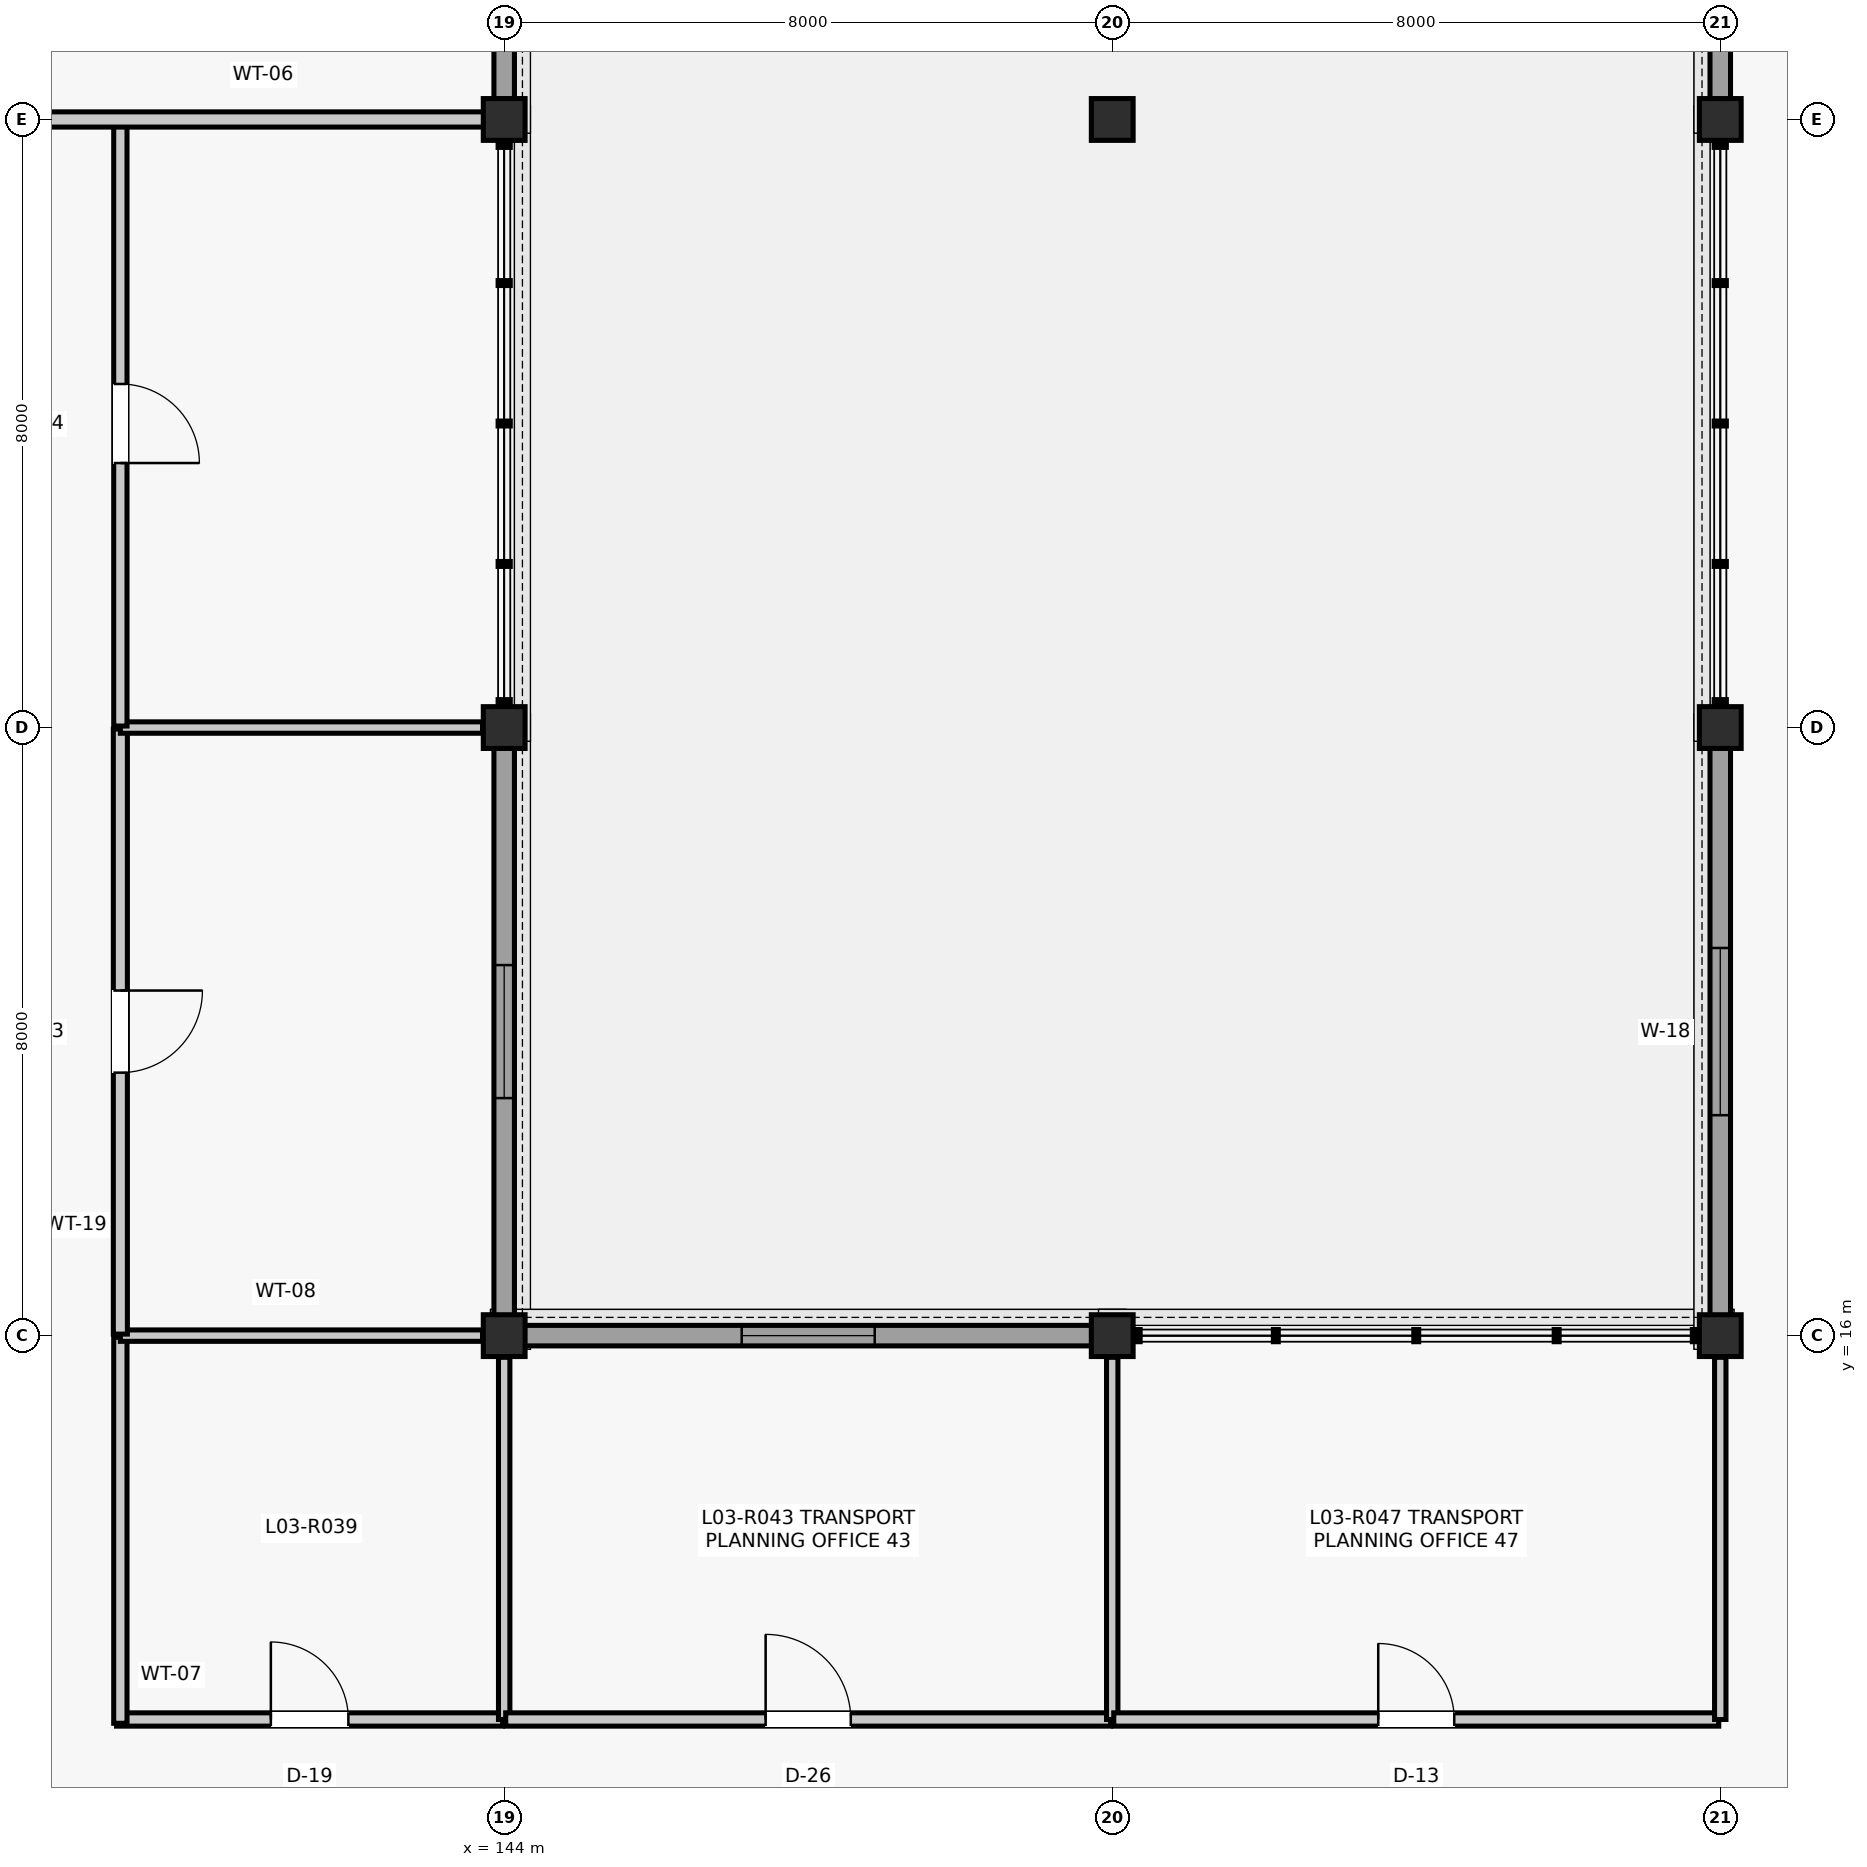
"""IFC4 building model, lengths in metres.
Left out: names, types, materials, properties, quantities, classifications, styles, units other than length and angle.
Written with IfcOpenShell. Run it as: python <this file> out.ifc"""

import sys

from ifc_helpers import new_model, si_unit, direction, frame, frame_2d, origin, origin_2d, place, context, subcontext, project, spatial, rectangle, extrude, element, fill, save


model = new_model("IFC4")
c1 = context("Model", 3, precision=1e-05, world=origin(), true_north=direction((0.0, 1.0)))
c2 = subcontext(c1, "Body", "Model", "MODEL_VIEW")
j1 = project(units=[si_unit("LENGTHUNIT", "METRE"), si_unit("PLANEANGLEUNIT", "RADIAN")], contexts=[c1])
p1 = place(None, origin())
s1 = spatial("IfcSite", under=j1, at=p1, CompositionType="ELEMENT")
p2 = place(p1, origin())
s2 = spatial("IfcBuilding", under=s1, at=p2, CompositionType="ELEMENT")
p3 = place(p2, frame((0.0, 0.0, 13.86)))
s3 = spatial("IfcBuildingStorey", under=s2, at=p3, CompositionType="ELEMENT", Elevation=13.86)
for number, where, z_axis, x_axis in (
    (1, (144.0, 16.0, 0.0), (0.0, 0.0, 1.0), (1.0, 0.0, 0.0)),
    (2, (144.0, 24.0, 0.0), (0.0, 0.0, 1.0), (1.0, 0.0, 0.0)),
    (3, (144.0, 32.0, 0.0), (0.0, 0.0, 1.0), (1.0, 0.0, 0.0)),
    (4, (152.0, 16.0, 0.0), (0.0, 0.0, 1.0), (1.0, 0.0, 0.0)),
    (5, (152.0, 32.0, 0.0), (0.0, 0.0, 1.0), (1.0, 0.0, 0.0)),
    (6, (160.0, 16.0, 0.0), (0.0, 0.0, 1.0), (1.0, 0.0, 0.0)),
    (7, (160.0, 24.0, 0.0), (0.0, 0.0, 1.0), (1.0, 0.0, 0.0)),
    (8, (160.0, 32.0, 0.0), (0.0, 0.0, 1.0), (1.0, 0.0, 0.0)),
):
    element("IfcColumn", number, at=place(p3, frame(where, z_axis=z_axis, x_axis=x_axis)), inside=s3, PredefinedType="COLUMN", context=c2, shape_type="SweptSolid", body=[
        extrude(rectangle(XDim=0.55, YDim=0.55, at=origin_2d()), origin(), (0.0, 0.0, 1.0), 3.96),
    ])
p4 = place(p3, frame((144.0, 16.26, 0.0), z_axis=(0.0, 0.0, 1.0), x_axis=(0.0, 1.0, 0.0)))
e9 = element("IfcWall", 9, at=p4, inside=s3, PredefinedType="SOLIDWALL", context=c2, shape_type="SweptSolid", body=[
    extrude(rectangle(XDim=7.48, YDim=0.27, at=frame_2d((3.74, 0.0))), origin(), (0.0, 0.0, 1.0), 3.454),
])
p5 = place(p4, frame((2.865, 0.0, 0.9)))
e10 = element("IfcOpeningElement", 10, at=p5, cuts=e9, PredefinedType="OPENING", context=c2, shape_type="SweptSolid", body=[
    extrude(rectangle(XDim=1.75, YDim=1.85, at=frame_2d((0.875, 0.925))), frame((0.0, 0.145, 0.0), z_axis=(0.0, -1.0, 0.0), x_axis=(1.0, 0.0, 0.0)), (0.0, 0.0, 1.0), 0.29),
])
p6 = place(p3, frame((144.0, 32.26, 0.0), z_axis=(0.0, 0.0, 1.0), x_axis=(0.0, 1.0, 0.0)))
e11 = element("IfcWall", 11, at=p6, inside=s3, PredefinedType="SOLIDWALL", context=c2, shape_type="SweptSolid", body=[
    extrude(rectangle(XDim=7.48, YDim=0.27, at=frame_2d((3.74, 0.0))), origin(), (0.0, 0.0, 1.0), 3.359),
])
p7 = place(p6, frame((2.865, 0.0, 0.9)))
e12 = element("IfcOpeningElement", 12, at=p7, cuts=e11, PredefinedType="OPENING", context=c2, shape_type="SweptSolid", body=[
    extrude(rectangle(XDim=1.75, YDim=1.85, at=frame_2d((0.875, 0.925))), frame((0.0, 0.145, 0.0), z_axis=(0.0, -1.0, 0.0), x_axis=(1.0, 0.0, 0.0)), (0.0, 0.0, 1.0), 0.29),
])
p8 = place(p3, frame((144.26, 16.0, 0.0), z_axis=(0.0, 0.0, 1.0), x_axis=(1.0, 0.0, 0.0)))
e13 = element("IfcWall", 13, at=p8, inside=s3, PredefinedType="SOLIDWALL", context=c2, shape_type="SweptSolid", body=[
    extrude(rectangle(XDim=7.48, YDim=0.27, at=frame_2d((3.74, 0.0))), origin(), (0.0, 0.0, 1.0), 3.254),
])
p9 = place(p8, frame((2.865, 0.0, 0.9)))
e14 = element("IfcOpeningElement", 14, at=p9, cuts=e13, PredefinedType="OPENING", context=c2, shape_type="SweptSolid", body=[
    extrude(rectangle(XDim=1.75, YDim=1.85, at=frame_2d((0.875, 0.925))), frame((0.0, 0.145, 0.0), z_axis=(0.0, -1.0, 0.0), x_axis=(1.0, 0.0, 0.0)), (0.0, 0.0, 1.0), 0.29),
])
p10 = place(p3, frame((160.0, 16.26, 0.0), z_axis=(0.0, 0.0, 1.0), x_axis=(0.0, 1.0, 0.0)))
e15 = element("IfcWall", 15, at=p10, inside=s3, PredefinedType="SOLIDWALL", context=c2, shape_type="SweptSolid", body=[
    extrude(rectangle(XDim=7.48, YDim=0.27, at=frame_2d((3.74, 0.0))), origin(), (0.0, 0.0, 1.0), 3.255),
])
p11 = place(p10, frame((2.64, 0.0, 1.35)))
e16 = element("IfcOpeningElement", 16, at=p11, cuts=e15, PredefinedType="OPENING", context=c2, shape_type="SweptSolid", body=[
    extrude(rectangle(XDim=2.2, YDim=1.3, at=frame_2d((1.1, 0.65))), frame((0.0, 0.145, 0.0), z_axis=(0.0, -1.0, 0.0), x_axis=(1.0, 0.0, 0.0)), (0.0, 0.0, 1.0), 0.29),
])
p12 = place(p3, frame((160.0, 32.26, 0.0), z_axis=(0.0, 0.0, 1.0), x_axis=(0.0, 1.0, 0.0)))
e17 = element("IfcWall", 17, at=p12, inside=s3, PredefinedType="SOLIDWALL", context=c2, shape_type="SweptSolid", body=[
    extrude(rectangle(XDim=7.48, YDim=0.27, at=frame_2d((3.74, 0.0))), origin(), (0.0, 0.0, 1.0), 3.372),
])
p13 = place(p12, frame((0.671, 0.0, 0.95)))
e18 = element("IfcOpeningElement", 18, at=p13, cuts=e17, PredefinedType="OPENING", context=c2, shape_type="SweptSolid", body=[
    extrude(rectangle(XDim=1.35, YDim=1.9, at=frame_2d((0.675, 0.95))), frame((0.0, 0.145, 0.0), z_axis=(0.0, -1.0, 0.0), x_axis=(1.0, 0.0, 0.0)), (0.0, 0.0, 1.0), 0.29),
])
p14 = place(p12, frame((5.458, 0.0, 0.95)))
e19 = element("IfcOpeningElement", 19, at=p14, cuts=e17, PredefinedType="OPENING", context=c2, shape_type="SweptSolid", body=[
    extrude(rectangle(XDim=1.35, YDim=1.9, at=frame_2d((0.675, 0.95))), frame((0.0, 0.145, 0.0), z_axis=(0.0, -1.0, 0.0), x_axis=(1.0, 0.0, 0.0)), (0.0, 0.0, 1.0), 0.29),
])
p15 = place(p3, frame((138.9, 10.95, 0.0), z_axis=(0.0, 0.0, 1.0), x_axis=(1.0, 0.0, 0.0)))
e20 = element("IfcWall", 20, at=p15, inside=s3, PredefinedType="PARTITIONING", context=c2, shape_type="SweptSolid", body=[
    extrude(rectangle(XDim=5.08, YDim=0.175, at=frame_2d((2.54, 0.0))), origin(), (0.0, 0.0, 1.0), 3.248),
])
p16 = place(p15, frame((2.03, 0.0, 0.0)))
e21 = element("IfcOpeningElement", 21, at=p16, cuts=e20, PredefinedType="OPENING", context=c2, shape_type="SweptSolid", body=[
    extrude(rectangle(XDim=1.02, YDim=2.2, at=frame_2d((0.51, 1.1))), frame((0.0, 0.097, 0.0), z_axis=(0.0, -1.0, 0.0), x_axis=(1.0, 0.0, 0.0)), (0.0, 0.0, 1.0), 0.195),
])
p17 = place(p3, frame((138.95, 10.9, 0.0), z_axis=(0.0, 0.0, 1.0), x_axis=(0.0, 1.0, 0.0)))
e22 = element("IfcWall", 22, at=p17, inside=s3, PredefinedType="PARTITIONING", context=c2, shape_type="SweptSolid", body=[
    extrude(rectangle(XDim=5.08, YDim=0.175, at=frame_2d((2.54, 0.0))), origin(), (0.0, 0.0, 1.0), 3.447),
])
p18 = place(p3, frame((138.95, 16.0, 0.0), z_axis=(0.0, 0.0, 1.0), x_axis=(1.0, 0.0, 0.0)))
e23 = element("IfcWall", 23, at=p18, inside=s3, PredefinedType="PARTITIONING", context=c2, shape_type="SweptSolid", body=[
    extrude(rectangle(XDim=4.765, YDim=0.15, at=frame_2d((2.383, 0.0))), origin(), (0.0, 0.0, 1.0), 3.447),
])
p19 = place(p3, frame((144.0, 10.95, 0.0), z_axis=(0.0, 0.0, 1.0), x_axis=(0.0, 1.0, 0.0)))
e24 = element("IfcWall", 24, at=p19, inside=s3, PredefinedType="PARTITIONING", context=c2, shape_type="SweptSolid", body=[
    extrude(rectangle(XDim=4.765, YDim=0.15, at=frame_2d((2.383, 0.0))), origin(), (0.0, 0.0, 1.0), 3.248),
])
p20 = place(p3, frame((138.95, 16.02, 0.0), z_axis=(0.0, 0.0, 1.0), x_axis=(0.0, 1.0, 0.0)))
e25 = element("IfcWall", 25, at=p20, inside=s3, PredefinedType="PARTITIONING", context=c2, shape_type="SweptSolid", body=[
    extrude(rectangle(XDim=7.96, YDim=0.185, at=frame_2d((3.98, 0.0))), origin(), (0.0, 0.0, 1.0), 3.242),
])
p21 = place(p20, frame((3.44, 0.0, 0.0)))
e26 = element("IfcOpeningElement", 26, at=p21, cuts=e25, PredefinedType="OPENING", context=c2, shape_type="SweptSolid", body=[
    extrude(rectangle(XDim=1.08, YDim=2.2, at=frame_2d((0.54, 1.1))), frame((0.0, 0.103, 0.0), z_axis=(0.0, -1.0, 0.0), x_axis=(1.0, 0.0, 0.0)), (0.0, 0.0, 1.0), 0.205),
])
p22 = place(p3, frame((138.95, 24.0, 0.0), z_axis=(0.0, 0.0, 1.0), x_axis=(1.0, 0.0, 0.0)))
e27 = element("IfcWall", 27, at=p22, inside=s3, PredefinedType="PARTITIONING", context=c2, shape_type="SweptSolid", body=[
    extrude(rectangle(XDim=4.765, YDim=0.15, at=frame_2d((2.383, 0.0))), origin(), (0.0, 0.0, 1.0), 3.242),
])
p23 = place(p3, frame((138.95, 24.02, 0.0), z_axis=(0.0, 0.0, 1.0), x_axis=(0.0, 1.0, 0.0)))
e28 = element("IfcWall", 28, at=p23, inside=s3, PredefinedType="PARTITIONING", context=c2, shape_type="SweptSolid", body=[
    extrude(rectangle(XDim=7.96, YDim=0.175, at=frame_2d((3.98, 0.0))), origin(), (0.0, 0.0, 1.0), 3.242),
])
p24 = place(p23, frame((3.46, 0.0, 0.0)))
e29 = element("IfcOpeningElement", 29, at=p24, cuts=e28, PredefinedType="OPENING", context=c2, shape_type="SweptSolid", body=[
    extrude(rectangle(XDim=1.04, YDim=2.18, at=frame_2d((0.52, 1.09))), frame((0.0, 0.097, 0.0), z_axis=(0.0, -1.0, 0.0), x_axis=(1.0, 0.0, 0.0)), (0.0, 0.0, 1.0), 0.195),
])
p25 = place(p3, frame((144.02, 10.95, 0.0), z_axis=(0.0, 0.0, 1.0), x_axis=(1.0, 0.0, 0.0)))
e30 = element("IfcWall", 30, at=p25, inside=s3, PredefinedType="PARTITIONING", context=c2, shape_type="SweptSolid", body=[
    extrude(rectangle(XDim=7.96, YDim=0.175, at=frame_2d((3.98, 0.0))), origin(), (0.0, 0.0, 1.0), 3.248),
])
p26 = place(p25, frame((3.42, 0.0, 0.0)))
e31 = element("IfcOpeningElement", 31, at=p26, cuts=e30, PredefinedType="OPENING", context=c2, shape_type="SweptSolid", body=[
    extrude(rectangle(XDim=1.12, YDim=2.22, at=frame_2d((0.56, 1.11))), frame((0.0, 0.097, 0.0), z_axis=(0.0, -1.0, 0.0), x_axis=(1.0, 0.0, 0.0)), (0.0, 0.0, 1.0), 0.195),
])
p27 = place(p3, frame((152.0, 10.95, 0.0), z_axis=(0.0, 0.0, 1.0), x_axis=(0.0, 1.0, 0.0)))
e32 = element("IfcWall", 32, at=p27, inside=s3, PredefinedType="PARTITIONING", context=c2, shape_type="SweptSolid", body=[
    extrude(rectangle(XDim=4.765, YDim=0.15, at=frame_2d((2.383, 0.0))), origin(), (0.0, 0.0, 1.0), 3.452),
])
p28 = place(p3, frame((152.02, 10.95, 0.0), z_axis=(0.0, 0.0, 1.0), x_axis=(1.0, 0.0, 0.0)))
e33 = element("IfcWall", 33, at=p28, inside=s3, PredefinedType="PARTITIONING", context=c2, shape_type="SweptSolid", body=[
    extrude(rectangle(XDim=7.96, YDim=0.175, at=frame_2d((3.98, 0.0))), origin(), (0.0, 0.0, 1.0), 3.242),
])
p29 = place(p28, frame((3.48, 0.0, 0.0)))
e34 = element("IfcOpeningElement", 34, at=p29, cuts=e33, PredefinedType="OPENING", context=c2, shape_type="SweptSolid", body=[
    extrude(rectangle(XDim=1.0, YDim=2.15, at=frame_2d((0.5, 1.075))), frame((0.0, 0.097, 0.0), z_axis=(0.0, -1.0, 0.0), x_axis=(1.0, 0.0, 0.0)), (0.0, 0.0, 1.0), 0.195),
])
p30 = place(p3, frame((160.0, 10.95, 0.0), z_axis=(0.0, 0.0, 1.0), x_axis=(0.0, 1.0, 0.0)))
e35 = element("IfcWall", 35, at=p30, inside=s3, PredefinedType="PARTITIONING", context=c2, shape_type="SweptSolid", body=[
    extrude(rectangle(XDim=4.765, YDim=0.15, at=frame_2d((2.383, 0.0))), origin(), (0.0, 0.0, 1.0), 3.242),
])
p31 = place(p3, frame((136.265, 32.0, 0.0), z_axis=(0.0, 0.0, 1.0), x_axis=(1.0, 0.0, 0.0)))
e36 = element("IfcWall", 36, at=p31, inside=s3, PredefinedType="PARTITIONING", context=c2, shape_type="SweptSolid", body=[
    extrude(rectangle(XDim=7.47, YDim=0.2, at=frame_2d((3.735, 0.0))), origin(), (0.0, 0.0, 1.0), 3.248),
])
p32 = place(p31, frame((0.52, 0.0, 0.0)))
e37 = element("IfcOpeningElement", 37, at=p32, cuts=e36, PredefinedType="OPENING", context=c2, shape_type="SweptSolid", body=[
    extrude(rectangle(XDim=0.94, YDim=2.12, at=frame_2d((0.47, 1.06))), frame((0.0, 0.11, 0.0), z_axis=(0.0, -1.0, 0.0), x_axis=(1.0, 0.0, 0.0)), (0.0, 0.0, 1.0), 0.22),
])
p33 = place(p5, origin())
e38 = element("IfcWindow", 38, at=p33, inside=s3, PartitioningType="SINGLE_PANEL", PredefinedType="WINDOW", context=c2, shape_type="SweptSolid", body=[
    extrude(rectangle(XDim=1.75, YDim=1.85, at=frame_2d((0.875, 0.925))), frame((0.0, 0.03, 0.0), z_axis=(0.0, -1.0, 0.0), x_axis=(1.0, 0.0, 0.0)), (0.0, 0.0, 1.0), 0.06),
])
fill(e10, e38)
p34 = place(p9, origin())
e39 = element("IfcWindow", 39, at=p34, inside=s3, PartitioningType="SINGLE_PANEL", PredefinedType="WINDOW", context=c2, shape_type="SweptSolid", body=[
    extrude(rectangle(XDim=1.75, YDim=1.85, at=frame_2d((0.875, 0.925))), frame((0.0, 0.03, 0.0), z_axis=(0.0, -1.0, 0.0), x_axis=(1.0, 0.0, 0.0)), (0.0, 0.0, 1.0), 0.06),
])
fill(e14, e39)
p35 = place(p11, origin())
e40 = element("IfcWindow", 40, at=p35, inside=s3, PartitioningType="SINGLE_PANEL", PredefinedType="WINDOW", context=c2, shape_type="SweptSolid", body=[
    extrude(rectangle(XDim=2.2, YDim=1.3, at=frame_2d((1.1, 0.65))), frame((0.0, 0.03, 0.0), z_axis=(0.0, -1.0, 0.0), x_axis=(1.0, 0.0, 0.0)), (0.0, 0.0, 1.0), 0.06),
])
fill(e16, e40)
p36 = place(p16, origin())
e41 = element("IfcDoor", 41, at=p36, inside=s3, OperationType="SINGLE_SWING_LEFT", PredefinedType="DOOR", context=c2, shape_type="SweptSolid", body=[
    extrude(rectangle(XDim=1.02, YDim=2.2, at=frame_2d((0.51, 1.1))), frame((0.0, 0.025, 0.0), z_axis=(0.0, -1.0, 0.0), x_axis=(1.0, 0.0, 0.0)), (0.0, 0.0, 1.0), 0.05),
])
fill(e21, e41)
p37 = place(p21, frame((1.08, 0.0, 0.0), z_axis=(0.0, 0.0, 1.0), x_axis=(-1.0, 0.0, 0.0)))
e42 = element("IfcDoor", 42, at=p37, inside=s3, OperationType="SINGLE_SWING_RIGHT", PredefinedType="DOOR", context=c2, shape_type="SweptSolid", body=[
    extrude(rectangle(XDim=1.08, YDim=2.2, at=frame_2d((0.54, 1.1))), frame((0.0, 0.025, 0.0), z_axis=(0.0, -1.0, 0.0), x_axis=(1.0, 0.0, 0.0)), (0.0, 0.0, 1.0), 0.05),
])
fill(e26, e42)
p38 = place(p24, frame((1.04, 0.0, 0.0), z_axis=(0.0, 0.0, 1.0), x_axis=(-1.0, 0.0, 0.0)))
e43 = element("IfcDoor", 43, at=p38, inside=s3, OperationType="SINGLE_SWING_LEFT", PredefinedType="DOOR", context=c2, shape_type="SweptSolid", body=[
    extrude(rectangle(XDim=1.04, YDim=2.18, at=frame_2d((0.52, 1.09))), frame((0.0, 0.025, 0.0), z_axis=(0.0, -1.0, 0.0), x_axis=(1.0, 0.0, 0.0)), (0.0, 0.0, 1.0), 0.05),
])
fill(e29, e43)
p39 = place(p26, origin())
e44 = element("IfcDoor", 44, at=p39, inside=s3, OperationType="SINGLE_SWING_LEFT", PredefinedType="DOOR", context=c2, shape_type="SweptSolid", body=[
    extrude(rectangle(XDim=1.12, YDim=2.22, at=frame_2d((0.56, 1.11))), frame((0.0, 0.025, 0.0), z_axis=(0.0, -1.0, 0.0), x_axis=(1.0, 0.0, 0.0)), (0.0, 0.0, 1.0), 0.05),
])
fill(e31, e44)
p40 = place(p29, origin())
e45 = element("IfcDoor", 45, at=p40, inside=s3, OperationType="SINGLE_SWING_LEFT", PredefinedType="DOOR", context=c2, shape_type="SweptSolid", body=[
    extrude(rectangle(XDim=1.0, YDim=2.15, at=frame_2d((0.5, 1.075))), frame((0.0, 0.025, 0.0), z_axis=(0.0, -1.0, 0.0), x_axis=(1.0, 0.0, 0.0)), (0.0, 0.0, 1.0), 0.05),
])
fill(e34, e45)
save(model, sys.argv[1])
